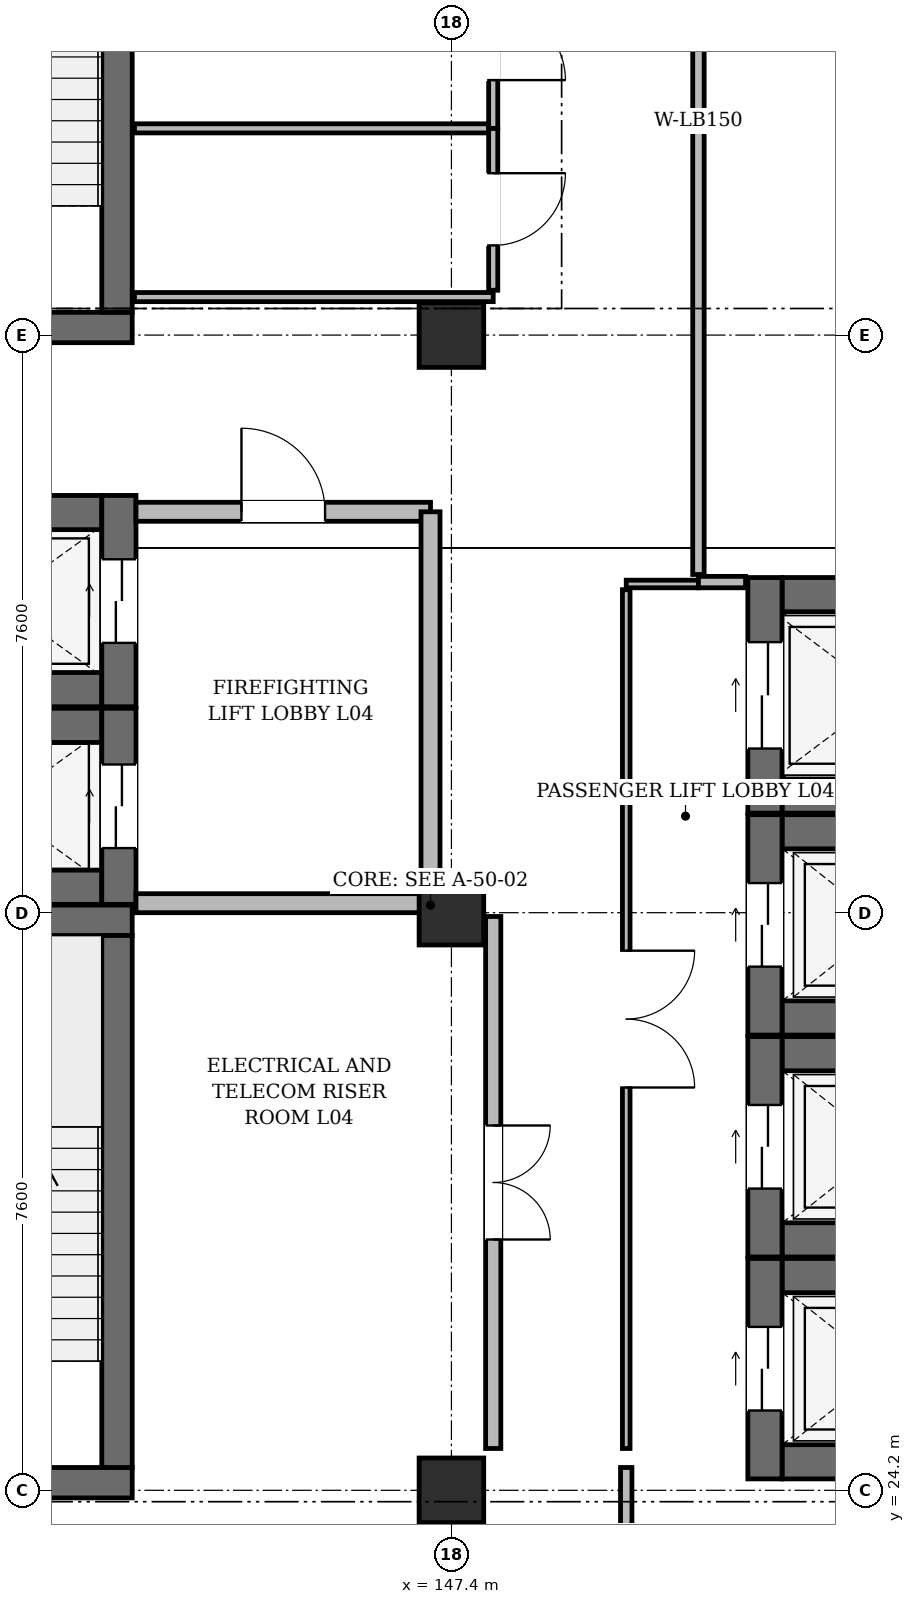
"""IFC4 building model, lengths in metres.
Left out: names, types, materials, properties, quantities, classifications, styles, units other than length and angle.
Written with IfcOpenShell. Run it as: python <this file> out.ifc"""

import sys

from ifc_helpers import new_model, si_unit, direction, frame, frame_2d, origin, origin_2d, place, context, subcontext, project, spatial, rectangle, extrude, element, fill, save


model = new_model("IFC4")
c1 = context("Model", 3, precision=1e-05, world=origin(), true_north=direction((0.0, 1.0)))
c2 = subcontext(c1, "Body", "Model", "MODEL_VIEW")
j1 = project(units=[si_unit("LENGTHUNIT", "METRE"), si_unit("PLANEANGLEUNIT", "RADIAN")], contexts=[c1])
p1 = place(None, origin())
s1 = spatial("IfcSite", under=j1, at=p1, CompositionType="ELEMENT")
p2 = place(p1, origin())
s2 = spatial("IfcBuilding", under=s1, at=p2, CompositionType="ELEMENT")
p3 = place(p2, frame((0.0, 0.0, 19.8)))
s3 = spatial("IfcBuildingStorey", under=s2, at=p3, CompositionType="ELEMENT", Elevation=19.8)
for number, where, z_axis, x_axis in (
    (1, (147.4, 24.2, 0.0), (0.0, 0.0, 1.0), (1.0, 0.0, 0.0)),
    (2, (147.4, 31.8, 0.0), (0.0, 0.0, 1.0), (1.0, 0.0, 0.0)),
    (3, (147.4, 39.4, 0.0), (0.0, 0.0, 1.0), (1.0, 0.0, 0.0)),
):
    element("IfcColumn", number, at=place(p3, frame(where, z_axis=z_axis, x_axis=x_axis)), inside=s3, PredefinedType="COLUMN", context=c2, shape_type="SweptSolid", body=[
        extrude(rectangle(XDim=0.85, YDim=0.85, at=origin_2d()), origin(), (0.0, 0.0, 1.0), 3.94),
    ])
p4 = place(p3, frame((139.4, 24.3, 0.0), z_axis=(0.0, 0.0, 1.0), x_axis=(1.0, 0.0, 0.0)))
e4 = element("IfcWall", 4, at=p4, inside=s3, PredefinedType="SHEAR", context=c2, shape_type="SweptSolid", body=[
    extrude(rectangle(XDim=3.8, YDim=0.4, at=frame_2d((1.9, 0.0))), origin(), (0.0, 0.0, 1.0), 3.94),
])
p5 = place(p4, frame((1.3, 0.0, 0.0)))
e5 = element("IfcOpeningElement", 5, at=p5, cuts=e4, PredefinedType="OPENING", context=c2, shape_type="SweptSolid", body=[
    extrude(rectangle(XDim=1.2, YDim=2.2, at=frame_2d((0.6, 1.1))), frame((0.0, 0.212, 0.0), z_axis=(0.0, -1.0, 0.0), x_axis=(1.0, 0.0, 0.0)), (0.0, 0.0, 1.0), 0.424),
])
p6 = place(p3, frame((139.4, 31.7, 0.0), z_axis=(0.0, 0.0, 1.0), x_axis=(1.0, 0.0, 0.0)))
e6 = element("IfcWall", 6, at=p6, inside=s3, PredefinedType="SHEAR", context=c2, shape_type="SweptSolid", body=[
    extrude(rectangle(XDim=3.8, YDim=0.4, at=frame_2d((1.9, 0.0))), origin(), (0.0, 0.0, 1.0), 3.94),
])
p7 = place(p3, frame((143.0, 24.5, 0.0), z_axis=(0.0, 0.0, 1.0), x_axis=(0.0, 1.0, 0.0)))
e7 = element("IfcWall", 7, at=p7, inside=s3, PredefinedType="SHEAR", context=c2, shape_type="SweptSolid", body=[
    extrude(rectangle(XDim=7.0, YDim=0.4, at=frame_2d((3.5, 0.0))), origin(), (0.0, 0.0, 1.0), 3.94),
])
p8 = place(p3, frame((139.4, 39.5, 0.0), z_axis=(0.0, 0.0, 1.0), x_axis=(1.0, 0.0, 0.0)))
e8 = element("IfcWall", 8, at=p8, inside=s3, PredefinedType="SHEAR", context=c2, shape_type="SweptSolid", body=[
    extrude(rectangle(XDim=3.8, YDim=0.4, at=frame_2d((1.9, 0.0))), origin(), (0.0, 0.0, 1.0), 3.94),
])
p9 = place(p8, frame((1.3, 0.0, 0.0)))
e9 = element("IfcOpeningElement", 9, at=p9, cuts=e8, PredefinedType="OPENING", context=c2, shape_type="SweptSolid", body=[
    extrude(rectangle(XDim=1.2, YDim=2.2, at=frame_2d((0.6, 1.1))), frame((0.0, 0.212, 0.0), z_axis=(0.0, -1.0, 0.0), x_axis=(1.0, 0.0, 0.0)), (0.0, 0.0, 1.0), 0.424),
])
p10 = place(p3, frame((143.0, 39.7, 0.0), z_axis=(0.0, 0.0, 1.0), x_axis=(0.0, 1.0, 0.0)))
e10 = element("IfcWall", 10, at=p10, inside=s3, PredefinedType="SHEAR", context=c2, shape_type="SweptSolid", body=[
    extrude(rectangle(XDim=7.0, YDim=0.4, at=frame_2d((3.5, 0.0))), origin(), (0.0, 0.0, 1.0), 3.94),
])
for number, where, z_axis, x_axis in (
    (11, (140.06, 32.135, 0.0), (0.0, 0.0, 1.0), (1.0, 0.0, 0.0)),
    (12, (140.06, 34.265, 0.0), (0.0, 0.0, 1.0), (1.0, 0.0, 0.0)),
):
    element("IfcWall", number, at=place(p3, frame(where, z_axis=z_axis, x_axis=x_axis)), inside=s3, PredefinedType="SHEAR", context=c2, shape_type="SweptSolid", body=[
        extrude(rectangle(XDim=2.74, YDim=0.45, at=frame_2d((1.37, 0.0))), origin(), (0.0, 0.0, 1.0), 3.94),
    ])
p11 = place(p3, frame((143.025, 31.91, 0.0), z_axis=(0.0, 0.0, 1.0), x_axis=(0.0, 1.0, 0.0)))
e13 = element("IfcWall", 13, at=p11, inside=s3, PredefinedType="SHEAR", context=c2, shape_type="SweptSolid", body=[
    extrude(rectangle(XDim=2.58, YDim=0.45, at=frame_2d((1.29, 0.0))), origin(), (0.0, 0.0, 1.0), 3.94),
])
p12 = place(p11, frame((0.74, 0.0, 0.0)))
e14 = element("IfcOpeningElement", 14, at=p12, cuts=e13, PredefinedType="OPENING", context=c2, shape_type="SweptSolid", body=[
    extrude(rectangle(XDim=1.1, YDim=2.2, at=frame_2d((0.55, 1.1))), frame((0.0, 0.237, 0.0), z_axis=(0.0, -1.0, 0.0), x_axis=(1.0, 0.0, 0.0)), (0.0, 0.0, 1.0), 0.474),
])
for number, where, z_axis, x_axis in (
    (15, (140.06, 34.735, 0.0), (0.0, 0.0, 1.0), (1.0, 0.0, 0.0)),
    (16, (140.06, 37.065, 0.0), (0.0, 0.0, 1.0), (1.0, 0.0, 0.0)),
):
    element("IfcWall", number, at=place(p3, frame(where, z_axis=z_axis, x_axis=x_axis)), inside=s3, PredefinedType="SHEAR", context=c2, shape_type="SweptSolid", body=[
        extrude(rectangle(XDim=2.74, YDim=0.45, at=frame_2d((1.37, 0.0))), origin(), (0.0, 0.0, 1.0), 3.94),
    ])
p13 = place(p3, frame((143.025, 34.51, 0.0), z_axis=(0.0, 0.0, 1.0), x_axis=(0.0, 1.0, 0.0)))
e17 = element("IfcWall", 17, at=p13, inside=s3, PredefinedType="SHEAR", context=c2, shape_type="SweptSolid", body=[
    extrude(rectangle(XDim=2.78, YDim=0.45, at=frame_2d((1.39, 0.0))), origin(), (0.0, 0.0, 1.0), 3.94),
])
p14 = place(p13, frame((0.84, 0.0, 0.0)))
e18 = element("IfcOpeningElement", 18, at=p14, cuts=e17, PredefinedType="OPENING", context=c2, shape_type="SweptSolid", body=[
    extrude(rectangle(XDim=1.1, YDim=2.2, at=frame_2d((0.55, 1.1))), frame((0.0, 0.237, 0.0), z_axis=(0.0, -1.0, 0.0), x_axis=(1.0, 0.0, 0.0)), (0.0, 0.0, 1.0), 0.474),
])
for number, where, z_axis, x_axis in (
    (19, (151.75, 24.575, 0.0), (0.0, 0.0, 1.0), (1.0, 0.0, 0.0)),
    (20, (151.75, 27.025, 0.0), (0.0, 0.0, 1.0), (1.0, 0.0, 0.0)),
):
    element("IfcWall", number, at=place(p3, frame(where, z_axis=z_axis, x_axis=x_axis)), inside=s3, PredefinedType="SHEAR", context=c2, shape_type="SweptSolid", body=[
        extrude(rectangle(XDim=2.7, YDim=0.45, at=frame_2d((1.35, 0.0))), origin(), (0.0, 0.0, 1.0), 3.94),
    ])
p15 = place(p3, frame((151.525, 24.35, 0.0), z_axis=(0.0, 0.0, 1.0), x_axis=(0.0, 1.0, 0.0)))
e21 = element("IfcWall", 21, at=p15, inside=s3, PredefinedType="SHEAR", context=c2, shape_type="SweptSolid", body=[
    extrude(rectangle(XDim=2.9, YDim=0.45, at=frame_2d((1.45, 0.0))), origin(), (0.0, 0.0, 1.0), 3.94),
])
p16 = place(p15, frame((0.9, 0.0, 0.0)))
e22 = element("IfcOpeningElement", 22, at=p16, cuts=e21, PredefinedType="OPENING", context=c2, shape_type="SweptSolid", body=[
    extrude(rectangle(XDim=1.1, YDim=2.2, at=frame_2d((0.55, 1.1))), frame((0.0, 0.237, 0.0), z_axis=(0.0, -1.0, 0.0), x_axis=(1.0, 0.0, 0.0)), (0.0, 0.0, 1.0), 0.474),
])
for number, where, z_axis, x_axis in (
    (23, (151.75, 27.495, 0.0), (0.0, 0.0, 1.0), (1.0, 0.0, 0.0)),
    (24, (151.75, 29.945, 0.0), (0.0, 0.0, 1.0), (1.0, 0.0, 0.0)),
):
    element("IfcWall", number, at=place(p3, frame(where, z_axis=z_axis, x_axis=x_axis)), inside=s3, PredefinedType="SHEAR", context=c2, shape_type="SweptSolid", body=[
        extrude(rectangle(XDim=2.7, YDim=0.45, at=frame_2d((1.35, 0.0))), origin(), (0.0, 0.0, 1.0), 3.94),
    ])
p17 = place(p3, frame((151.525, 27.27, 0.0), z_axis=(0.0, 0.0, 1.0), x_axis=(0.0, 1.0, 0.0)))
e25 = element("IfcWall", 25, at=p17, inside=s3, PredefinedType="SHEAR", context=c2, shape_type="SweptSolid", body=[
    extrude(rectangle(XDim=2.9, YDim=0.45, at=frame_2d((1.45, 0.0))), origin(), (0.0, 0.0, 1.0), 3.94),
])
p18 = place(p17, frame((0.9, 0.0, 0.0)))
e26 = element("IfcOpeningElement", 26, at=p18, cuts=e25, PredefinedType="OPENING", context=c2, shape_type="SweptSolid", body=[
    extrude(rectangle(XDim=1.1, YDim=2.2, at=frame_2d((0.55, 1.1))), frame((0.0, 0.237, 0.0), z_axis=(0.0, -1.0, 0.0), x_axis=(1.0, 0.0, 0.0)), (0.0, 0.0, 1.0), 0.474),
])
for number, where, z_axis, x_axis in (
    (27, (151.75, 30.415, 0.0), (0.0, 0.0, 1.0), (1.0, 0.0, 0.0)),
    (28, (151.75, 32.865, 0.0), (0.0, 0.0, 1.0), (1.0, 0.0, 0.0)),
):
    element("IfcWall", number, at=place(p3, frame(where, z_axis=z_axis, x_axis=x_axis)), inside=s3, PredefinedType="SHEAR", context=c2, shape_type="SweptSolid", body=[
        extrude(rectangle(XDim=2.7, YDim=0.45, at=frame_2d((1.35, 0.0))), origin(), (0.0, 0.0, 1.0), 3.94),
    ])
p19 = place(p3, frame((151.525, 30.19, 0.0), z_axis=(0.0, 0.0, 1.0), x_axis=(0.0, 1.0, 0.0)))
e29 = element("IfcWall", 29, at=p19, inside=s3, PredefinedType="SHEAR", context=c2, shape_type="SweptSolid", body=[
    extrude(rectangle(XDim=2.9, YDim=0.45, at=frame_2d((1.45, 0.0))), origin(), (0.0, 0.0, 1.0), 3.94),
])
p20 = place(p19, frame((0.9, 0.0, 0.0)))
e30 = element("IfcOpeningElement", 30, at=p20, cuts=e29, PredefinedType="OPENING", context=c2, shape_type="SweptSolid", body=[
    extrude(rectangle(XDim=1.1, YDim=2.2, at=frame_2d((0.55, 1.1))), frame((0.0, 0.237, 0.0), z_axis=(0.0, -1.0, 0.0), x_axis=(1.0, 0.0, 0.0)), (0.0, 0.0, 1.0), 0.474),
])
for number, where, z_axis, x_axis in (
    (31, (151.75, 33.335, 0.0), (0.0, 0.0, 1.0), (1.0, 0.0, 0.0)),
    (32, (151.75, 35.985, 0.0), (0.0, 0.0, 1.0), (1.0, 0.0, 0.0)),
):
    element("IfcWall", number, at=place(p3, frame(where, z_axis=z_axis, x_axis=x_axis)), inside=s3, PredefinedType="SHEAR", context=c2, shape_type="SweptSolid", body=[
        extrude(rectangle(XDim=2.7, YDim=0.45, at=frame_2d((1.35, 0.0))), origin(), (0.0, 0.0, 1.0), 3.94),
    ])
p21 = place(p3, frame((151.525, 33.11, 0.0), z_axis=(0.0, 0.0, 1.0), x_axis=(0.0, 1.0, 0.0)))
e33 = element("IfcWall", 33, at=p21, inside=s3, PredefinedType="SHEAR", context=c2, shape_type="SweptSolid", body=[
    extrude(rectangle(XDim=3.1, YDim=0.45, at=frame_2d((1.55, 0.0))), origin(), (0.0, 0.0, 1.0), 3.94),
])
p22 = place(p21, frame((0.85, 0.0, 0.0)))
e34 = element("IfcOpeningElement", 34, at=p22, cuts=e33, PredefinedType="OPENING", context=c2, shape_type="SweptSolid", body=[
    extrude(rectangle(XDim=1.4, YDim=2.3, at=frame_2d((0.7, 1.15))), frame((0.0, 0.237, 0.0), z_axis=(0.0, -1.0, 0.0), x_axis=(1.0, 0.0, 0.0)), (0.0, 0.0, 1.0), 0.474),
])
p23 = place(p3, frame((143.25, 37.075, 0.0), z_axis=(0.0, 0.0, 1.0), x_axis=(1.0, 0.0, 0.0)))
e35 = element("IfcWall", 35, at=p23, inside=s3, PredefinedType="SOLIDWALL", context=c2, shape_type="SweptSolid", body=[
    extrude(rectangle(XDim=3.875, YDim=0.25, at=frame_2d((1.938, 0.0))), origin(), (0.0, 0.0, 1.0), 3.805),
])
p24 = place(p23, frame((1.387, 0.0, 0.0)))
e36 = element("IfcOpeningElement", 36, at=p24, cuts=e35, PredefinedType="OPENING", context=c2, shape_type="SweptSolid", body=[
    extrude(rectangle(XDim=1.1, YDim=2.2, at=frame_2d((0.55, 1.1))), frame((0.0, 0.137, 0.0), z_axis=(0.0, -1.0, 0.0), x_axis=(1.0, 0.0, 0.0)), (0.0, 0.0, 1.0), 0.274),
])
p25 = place(p3, frame((143.25, 31.925, 0.0), z_axis=(0.0, 0.0, 1.0), x_axis=(1.0, 0.0, 0.0)))
e37 = element("IfcWall", 37, at=p25, inside=s3, PredefinedType="SOLIDWALL", context=c2, shape_type="SweptSolid", body=[
    extrude(rectangle(XDim=3.875, YDim=0.25, at=frame_2d((1.938, 0.0))), origin(), (0.0, 0.0, 1.0), 3.275),
])
p26 = place(p3, frame((147.125, 31.925, 0.0), z_axis=(0.0, 0.0, 1.0), x_axis=(0.0, 1.0, 0.0)))
e38 = element("IfcWall", 38, at=p26, inside=s3, PredefinedType="SOLIDWALL", context=c2, shape_type="SweptSolid", body=[
    extrude(rectangle(XDim=5.15, YDim=0.25, at=frame_2d((2.575, 0.0))), origin(), (0.0, 0.0, 1.0), 3.275),
])
p27 = place(p3, frame((143.23, 39.9, 0.0), z_axis=(0.0, 0.0, 1.0), x_axis=(1.0, 0.0, 0.0)))
e39 = element("IfcWall", 39, at=p27, inside=s3, PredefinedType="PARTITIONING", context=c2, shape_type="SweptSolid", body=[
    extrude(rectangle(XDim=4.72, YDim=0.12, at=frame_2d((2.36, 0.0))), origin(), (0.0, 0.0, 1.0), 3.805),
])
p28 = place(p3, frame((147.95, 31.75, 0.0), z_axis=(0.0, 0.0, 1.0), x_axis=(0.0, -1.0, 0.0)))
e40 = element("IfcWall", 40, at=p28, inside=s3, PredefinedType="PARTITIONING", context=c2, shape_type="SweptSolid", body=[
    extrude(rectangle(XDim=7.0, YDim=0.2, at=frame_2d((3.5, 0.0))), origin(), (0.0, 0.0, 1.0), 3.805),
])
p29 = place(p28, frame((2.75, 0.0, 0.0)))
e41 = element("IfcOpeningElement", 41, at=p29, cuts=e40, PredefinedType="OPENING", context=c2, shape_type="SweptSolid", body=[
    extrude(rectangle(XDim=1.5, YDim=2.2, at=frame_2d((0.75, 1.1))), frame((0.0, 0.112, 0.0), z_axis=(0.0, -1.0, 0.0), x_axis=(1.0, 0.0, 0.0)), (0.0, 0.0, 1.0), 0.224),
])
p30 = place(p3, frame((149.7, 24.75, 0.0), z_axis=(0.0, 0.0, 1.0), x_axis=(0.0, 1.0, 0.0)))
e42 = element("IfcWall", 42, at=p30, inside=s3, PredefinedType="PARTITIONING", context=c2, shape_type="SweptSolid", body=[
    extrude(rectangle(XDim=11.3, YDim=0.1, at=frame_2d((5.65, 0.0))), origin(), (0.0, 0.0, 1.0), 3.805),
])
p31 = place(p30, frame((4.75, 0.0, 0.0)))
e43 = element("IfcOpeningElement", 43, at=p31, cuts=e42, PredefinedType="OPENING", context=c2, shape_type="SweptSolid", body=[
    extrude(rectangle(XDim=1.8, YDim=2.4, at=frame_2d((0.9, 1.2))), frame((0.0, 0.062, 0.0), z_axis=(0.0, -1.0, 0.0), x_axis=(1.0, 0.0, 0.0)), (0.0, 0.0, 1.0), 0.124),
])
p32 = place(p3, frame((149.7, 36.125, 0.0), z_axis=(0.0, 0.0, 1.0), x_axis=(1.0, 0.0, 0.0)))
e44 = element("IfcWall", 44, at=p32, inside=s3, PredefinedType="PARTITIONING", context=c2, shape_type="SweptSolid", body=[
    extrude(rectangle(XDim=0.95, YDim=0.1, at=frame_2d((0.475, 0.0))), origin(), (0.0, 0.0, 1.0), 3.805),
])
p33 = place(p3, frame((150.65, 36.15, 0.0), z_axis=(0.0, 0.0, 1.0), x_axis=(1.0, 0.0, 0.0)))
e45 = element("IfcWall", 45, at=p33, inside=s3, PredefinedType="PARTITIONING", context=c2, shape_type="SweptSolid", body=[
    extrude(rectangle(XDim=0.62, YDim=0.15, at=frame_2d((0.31, 0.0))), origin(), (0.0, 0.0, 1.0), 3.805),
])
p34 = place(p3, frame((143.23, 42.12, 0.0), z_axis=(0.0, 0.0, 1.0), x_axis=(1.0, 0.0, 0.0)))
e46 = element("IfcWall", 46, at=p34, inside=s3, PredefinedType="PARTITIONING", context=c2, shape_type="SweptSolid", body=[
    extrude(rectangle(XDim=4.72, YDim=0.12, at=frame_2d((2.36, 0.0))), origin(), (0.0, 0.0, 1.0), 3.415),
])
p35 = place(p3, frame((147.95, 42.12, 0.0), z_axis=(0.0, 0.0, 1.0), x_axis=(0.0, -1.0, 0.0)))
e47 = element("IfcWall", 47, at=p35, inside=s3, PredefinedType="PARTITIONING", context=c2, shape_type="SweptSolid", body=[
    extrude(rectangle(XDim=2.13, YDim=0.12, at=frame_2d((1.065, 0.0))), origin(), (0.0, 0.0, 1.0), 3.805),
])
p36 = place(p35, frame((0.59, 0.0, 0.0)))
e48 = element("IfcOpeningElement", 48, at=p36, cuts=e47, PredefinedType="OPENING", context=c2, shape_type="SweptSolid", body=[
    extrude(rectangle(XDim=0.95, YDim=2.15, at=frame_2d((0.475, 1.075))), frame((0.0, 0.072, 0.0), z_axis=(0.0, -1.0, 0.0), x_axis=(1.0, 0.0, 0.0)), (0.0, 0.0, 1.0), 0.144),
])
p37 = place(p3, frame((147.95, 44.34, 0.0), z_axis=(0.0, 0.0, 1.0), x_axis=(0.0, -1.0, 0.0)))
e49 = element("IfcWall", 49, at=p37, inside=s3, PredefinedType="PARTITIONING", context=c2, shape_type="SweptSolid", body=[
    extrude(rectangle(XDim=2.22, YDim=0.12, at=frame_2d((1.11, 0.0))), origin(), (0.0, 0.0, 1.0), 3.805),
])
p38 = place(p37, frame((0.635, 0.0, 0.0)))
e50 = element("IfcOpeningElement", 50, at=p38, cuts=e49, PredefinedType="OPENING", context=c2, shape_type="SweptSolid", body=[
    extrude(rectangle(XDim=0.95, YDim=2.15, at=frame_2d((0.475, 1.075))), frame((0.0, 0.072, 0.0), z_axis=(0.0, -1.0, 0.0), x_axis=(1.0, 0.0, 0.0)), (0.0, 0.0, 1.0), 0.144),
])
p39 = place(p3, frame((149.7, 24.5, 0.0), z_axis=(0.0, 0.0, 1.0), x_axis=(0.0, -1.0, 0.0)))
e51 = element("IfcWall", 51, at=p39, inside=s3, PredefinedType="PARTITIONING", context=c2, shape_type="SweptSolid", body=[
    extrude(rectangle(XDim=0.8, YDim=0.15, at=frame_2d((0.4, 0.0))), origin(), (0.0, 0.0, 1.0), 3.805),
])
p40 = place(p3, frame((150.65, 62.2, 0.0), z_axis=(0.0, 0.0, 1.0), x_axis=(0.0, -1.0, 0.0)))
e52 = element("IfcWall", 52, at=p40, inside=s3, PredefinedType="PARTITIONING", context=c2, shape_type="SweptSolid", body=[
    extrude(rectangle(XDim=25.95, YDim=0.15, at=frame_2d((12.975, 0.0))), origin(), (0.0, 0.0, 1.0), 3.805),
])
p41 = place(p40, frame((12.275, 0.0, 0.0)))
e53 = element("IfcOpeningElement", 53, at=p41, cuts=e52, PredefinedType="OPENING", context=c2, shape_type="SweptSolid", body=[
    extrude(rectangle(XDim=1.4, YDim=2.2, at=frame_2d((0.7, 1.1))), frame((0.0, 0.087, 0.0), z_axis=(0.0, -1.0, 0.0), x_axis=(1.0, 0.0, 0.0)), (0.0, 0.0, 1.0), 0.174),
])
p42 = place(p12, origin())
e54 = element("IfcDoor", 54, at=p42, inside=s3, OperationType="DOUBLE_DOOR_SLIDING", PredefinedType="DOOR", context=c2, shape_type="SweptSolid", body=[
    extrude(rectangle(XDim=1.1, YDim=2.2, at=frame_2d((0.55, 1.1))), frame((0.0, 0.025, 0.0), z_axis=(0.0, -1.0, 0.0), x_axis=(1.0, 0.0, 0.0)), (0.0, 0.0, 1.0), 0.05),
])
fill(e14, e54)
p43 = place(p14, origin())
e55 = element("IfcDoor", 55, at=p43, inside=s3, OperationType="DOUBLE_DOOR_SLIDING", PredefinedType="DOOR", context=c2, shape_type="SweptSolid", body=[
    extrude(rectangle(XDim=1.1, YDim=2.2, at=frame_2d((0.55, 1.1))), frame((0.0, 0.025, 0.0), z_axis=(0.0, -1.0, 0.0), x_axis=(1.0, 0.0, 0.0)), (0.0, 0.0, 1.0), 0.05),
])
fill(e18, e55)
p44 = place(p16, origin())
e56 = element("IfcDoor", 56, at=p44, inside=s3, OperationType="DOUBLE_DOOR_SLIDING", PredefinedType="DOOR", context=c2, shape_type="SweptSolid", body=[
    extrude(rectangle(XDim=1.1, YDim=2.2, at=frame_2d((0.55, 1.1))), frame((0.0, 0.025, 0.0), z_axis=(0.0, -1.0, 0.0), x_axis=(1.0, 0.0, 0.0)), (0.0, 0.0, 1.0), 0.05),
])
fill(e22, e56)
p45 = place(p18, origin())
e57 = element("IfcDoor", 57, at=p45, inside=s3, OperationType="DOUBLE_DOOR_SLIDING", PredefinedType="DOOR", context=c2, shape_type="SweptSolid", body=[
    extrude(rectangle(XDim=1.1, YDim=2.2, at=frame_2d((0.55, 1.1))), frame((0.0, 0.025, 0.0), z_axis=(0.0, -1.0, 0.0), x_axis=(1.0, 0.0, 0.0)), (0.0, 0.0, 1.0), 0.05),
])
fill(e26, e57)
p46 = place(p20, origin())
e58 = element("IfcDoor", 58, at=p46, inside=s3, OperationType="DOUBLE_DOOR_SLIDING", PredefinedType="DOOR", context=c2, shape_type="SweptSolid", body=[
    extrude(rectangle(XDim=1.1, YDim=2.2, at=frame_2d((0.55, 1.1))), frame((0.0, 0.025, 0.0), z_axis=(0.0, -1.0, 0.0), x_axis=(1.0, 0.0, 0.0)), (0.0, 0.0, 1.0), 0.05),
])
fill(e30, e58)
p47 = place(p22, origin())
e59 = element("IfcDoor", 59, at=p47, inside=s3, OperationType="DOUBLE_DOOR_SLIDING", PredefinedType="DOOR", context=c2, shape_type="SweptSolid", body=[
    extrude(rectangle(XDim=1.4, YDim=2.3, at=frame_2d((0.7, 1.15))), frame((0.0, 0.025, 0.0), z_axis=(0.0, -1.0, 0.0), x_axis=(1.0, 0.0, 0.0)), (0.0, 0.0, 1.0), 0.05),
])
fill(e34, e59)
p48 = place(p24, origin())
e60 = element("IfcDoor", 60, at=p48, inside=s3, OperationType="SINGLE_SWING_LEFT", PredefinedType="DOOR", context=c2, shape_type="SweptSolid", body=[
    extrude(rectangle(XDim=1.1, YDim=2.2, at=frame_2d((0.55, 1.1))), frame((0.0, 0.025, 0.0), z_axis=(0.0, -1.0, 0.0), x_axis=(1.0, 0.0, 0.0)), (0.0, 0.0, 1.0), 0.05),
])
fill(e36, e60)
p49 = place(p29, origin())
e61 = element("IfcDoor", 61, at=p49, inside=s3, OperationType="DOUBLE_DOOR_SINGLE_SWING", PredefinedType="DOOR", context=c2, shape_type="SweptSolid", body=[
    extrude(rectangle(XDim=1.5, YDim=2.2, at=frame_2d((0.75, 1.1))), frame((0.0, 0.025, 0.0), z_axis=(0.0, -1.0, 0.0), x_axis=(1.0, 0.0, 0.0)), (0.0, 0.0, 1.0), 0.05),
])
fill(e41, e61)
p50 = place(p31, frame((1.8, 0.0, 0.0), z_axis=(0.0, 0.0, 1.0), x_axis=(-1.0, 0.0, 0.0)))
e62 = element("IfcDoor", 62, at=p50, inside=s3, OperationType="DOUBLE_DOOR_SINGLE_SWING", PredefinedType="DOOR", context=c2, shape_type="SweptSolid", body=[
    extrude(rectangle(XDim=1.8, YDim=2.4, at=frame_2d((0.9, 1.2))), frame((0.0, 0.025, 0.0), z_axis=(0.0, -1.0, 0.0), x_axis=(1.0, 0.0, 0.0)), (0.0, 0.0, 1.0), 0.05),
])
fill(e43, e62)
p51 = place(p36, origin())
e63 = element("IfcDoor", 63, at=p51, inside=s3, OperationType="SINGLE_SWING_LEFT", PredefinedType="DOOR", context=c2, shape_type="SweptSolid", body=[
    extrude(rectangle(XDim=0.95, YDim=2.15, at=frame_2d((0.475, 1.075))), frame((0.0, 0.025, 0.0), z_axis=(0.0, -1.0, 0.0), x_axis=(1.0, 0.0, 0.0)), (0.0, 0.0, 1.0), 0.05),
])
fill(e48, e63)
p52 = place(p38, origin())
e64 = element("IfcDoor", 64, at=p52, inside=s3, OperationType="SINGLE_SWING_RIGHT", PredefinedType="DOOR", context=c2, shape_type="SweptSolid", body=[
    extrude(rectangle(XDim=0.95, YDim=2.15, at=frame_2d((0.475, 1.075))), frame((0.0, 0.025, 0.0), z_axis=(0.0, -1.0, 0.0), x_axis=(1.0, 0.0, 0.0)), (0.0, 0.0, 1.0), 0.05),
])
fill(e50, e64)
save(model, sys.argv[1])
